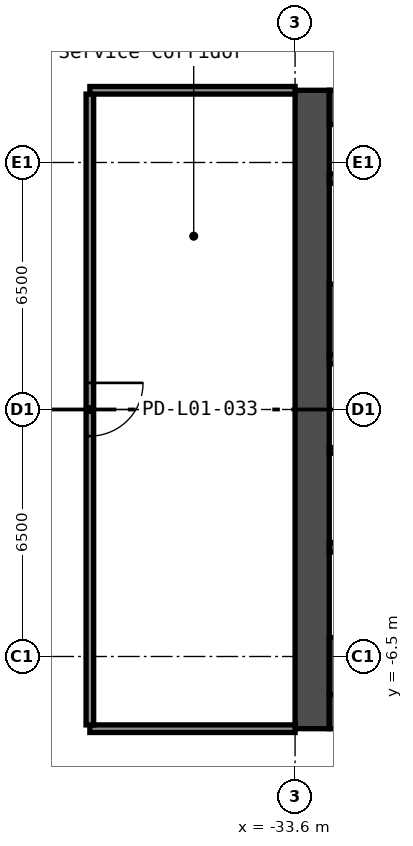
"""IFC4 building model, lengths in metres.
Left out: names, types, materials, properties, quantities, classifications, styles, units other than length and angle.
Written with IfcOpenShell. Run it as: python <this file> out.ifc"""

import sys

from ifc_helpers import new_model, si_unit, direction, frame, frame_2d, origin, place, context, subcontext, project, spatial, rectangle, extrude, element, fill, save


model = new_model("IFC4")
c1 = context("Model", 3, precision=1e-05, world=origin(), true_north=direction((0.0, 1.0)))
c2 = subcontext(c1, "Body", "Model", "MODEL_VIEW")
j1 = project(units=[si_unit("LENGTHUNIT", "METRE"), si_unit("PLANEANGLEUNIT", "RADIAN")], contexts=[c1])
p1 = place(None, origin())
s1 = spatial("IfcSite", under=j1, at=p1, CompositionType="ELEMENT")
p2 = place(p1, origin())
s2 = spatial("IfcBuilding", under=s1, at=p2, CompositionType="ELEMENT")
p3 = place(p2, origin())
s3 = spatial("IfcBuildingStorey", under=s2, at=p3, CompositionType="ELEMENT", Elevation=0.0)
p4 = place(p3, frame((-33.15, -8.4, 0.0), z_axis=(0.0, 0.0, 1.0), x_axis=(0.0, 1.0, 0.0)))
e1 = element("IfcWall", 1, at=p4, inside=s3, PredefinedType="SHEAR", context=c2, shape_type="SweptSolid", body=[
    extrude(rectangle(XDim=16.8, YDim=0.9, at=frame_2d((8.4, 0.0))), origin(), (0.0, 0.0, 1.0), 8.6),
])
p5 = place(p3, frame((-32.7, 7.95, 0.0), z_axis=(0.0, 0.0, 1.0), x_axis=(1.0, 0.0, 0.0)))
e2 = element("IfcWall", 2, at=p5, inside=s3, PredefinedType="SHEAR", context=c2, shape_type="SweptSolid", body=[
    extrude(rectangle(XDim=15.0, YDim=0.9, at=frame_2d((7.5, 0.0))), origin(), (0.0, 0.0, 1.0), 8.6),
])
p6 = place(p5, frame((3.4, 0.0, 0.0)))
e3 = element("IfcOpeningElement", 3, at=p6, cuts=e2, PredefinedType="OPENING", context=c2, shape_type="SweptSolid", body=[
    extrude(rectangle(XDim=1.2, YDim=2.1, at=frame_2d((0.6, 1.05))), frame((0.0, 0.46, 0.0), z_axis=(0.0, -1.0, 0.0), x_axis=(1.0, 0.0, 0.0)), (0.0, 0.0, 1.0), 0.92),
])
p7 = place(p5, frame((0.75, 0.0, 0.0)))
e4 = element("IfcOpeningElement", 4, at=p7, cuts=e2, PredefinedType="OPENING", context=c2, shape_type="SweptSolid", body=[
    extrude(rectangle(XDim=0.9, YDim=2.1, at=frame_2d((0.45, 1.05))), frame((0.0, 0.46, 0.0), z_axis=(0.0, -1.0, 0.0), x_axis=(1.0, 0.0, 0.0)), (0.0, 0.0, 1.0), 0.92),
])
p8 = place(p5, frame((7.05, 0.0, 0.0)))
e5 = element("IfcOpeningElement", 5, at=p8, cuts=e2, PredefinedType="OPENING", context=c2, shape_type="SweptSolid", body=[
    extrude(rectangle(XDim=1.2, YDim=2.1, at=frame_2d((0.6, 1.05))), frame((0.0, 0.46, 0.0), z_axis=(0.0, -1.0, 0.0), x_axis=(1.0, 0.0, 0.0)), (0.0, 0.0, 1.0), 0.92),
])
p9 = place(p3, frame((-32.7, -7.95, 0.0), z_axis=(0.0, 0.0, 1.0), x_axis=(1.0, 0.0, 0.0)))
e6 = element("IfcWall", 6, at=p9, inside=s3, PredefinedType="SHEAR", context=c2, shape_type="SweptSolid", body=[
    extrude(rectangle(XDim=15.0, YDim=0.9, at=frame_2d((7.5, 0.0))), origin(), (0.0, 0.0, 1.0), 8.6),
])
p10 = place(p9, frame((11.45, 0.0, 0.0)))
e7 = element("IfcOpeningElement", 7, at=p10, cuts=e6, PredefinedType="OPENING", context=c2, shape_type="SweptSolid", body=[
    extrude(rectangle(XDim=1.0, YDim=2.1, at=frame_2d((0.5, 1.05))), frame((0.0, 0.46, 0.0), z_axis=(0.0, -1.0, 0.0), x_axis=(1.0, 0.0, 0.0)), (0.0, 0.0, 1.0), 0.92),
])
p11 = place(p9, frame((9.6, 0.0, 0.0)))
e8 = element("IfcOpeningElement", 8, at=p11, cuts=e6, PredefinedType="OPENING", context=c2, shape_type="SweptSolid", body=[
    extrude(rectangle(XDim=1.2, YDim=2.1, at=frame_2d((0.6, 1.05))), frame((0.0, 0.46, 0.0), z_axis=(0.0, -1.0, 0.0), x_axis=(1.0, 0.0, 0.0)), (0.0, 0.0, 1.0), 0.92),
])
p12 = place(p3, frame((-32.7, 1.325, 0.0), z_axis=(0.0, 0.0, 1.0), x_axis=(1.0, 0.0, 0.0)))
e9 = element("IfcWall", 9, at=p12, inside=s3, PredefinedType="SHEAR", context=c2, shape_type="SweptSolid", body=[
    extrude(rectangle(XDim=5.05, YDim=0.25, at=frame_2d((2.525, 0.0))), origin(), (0.0, 0.0, 1.0), 8.6),
])
p13 = place(p12, frame((3.3, 0.0, 0.0)))
e10 = element("IfcOpeningElement", 10, at=p13, cuts=e9, PredefinedType="OPENING", context=c2, shape_type="SweptSolid", body=[
    extrude(rectangle(XDim=1.2, YDim=2.1, at=frame_2d((0.6, 1.05))), frame((0.0, 0.135, 0.0), z_axis=(0.0, -1.0, 0.0), x_axis=(1.0, 0.0, 0.0)), (0.0, 0.0, 1.0), 0.27),
])
p14 = place(p3, frame((-32.7, 2.375, 0.0), z_axis=(0.0, 0.0, 1.0), x_axis=(1.0, 0.0, 0.0)))
e11 = element("IfcWall", 11, at=p14, inside=s3, PredefinedType="SHEAR", context=c2, shape_type="SweptSolid", body=[
    extrude(rectangle(XDim=2.4, YDim=1.85, at=frame_2d((1.2, 0.0))), origin(), (0.0, 0.0, 1.0), 8.6),
])
p15 = place(p3, frame((-32.7, 6.075, 0.0), z_axis=(0.0, 0.0, 1.0), x_axis=(1.0, 0.0, 0.0)))
e12 = element("IfcWall", 12, at=p15, inside=s3, PredefinedType="SHEAR", context=c2, shape_type="SweptSolid", body=[
    extrude(rectangle(XDim=2.4, YDim=0.25, at=frame_2d((1.2, 0.0))), origin(), (0.0, 0.0, 1.0), 8.6),
])
p16 = place(p3, frame((-32.7, -3.625, 0.0), z_axis=(0.0, 0.0, 1.0), x_axis=(1.0, 0.0, 0.0)))
e13 = element("IfcWall", 13, at=p16, inside=s3, PredefinedType="SHEAR", context=c2, shape_type="SweptSolid", body=[
    extrude(rectangle(XDim=4.55, YDim=0.25, at=frame_2d((2.275, 0.0))), origin(), (0.0, 0.0, 1.0), 8.6),
])
p17 = place(p16, frame((2.85, 0.0, 0.0)))
e14 = element("IfcOpeningElement", 14, at=p17, cuts=e13, PredefinedType="OPENING", context=c2, shape_type="SweptSolid", body=[
    extrude(rectangle(XDim=1.1, YDim=2.1, at=frame_2d((0.55, 1.05))), frame((0.0, 0.135, 0.0), z_axis=(0.0, -1.0, 0.0), x_axis=(1.0, 0.0, 0.0)), (0.0, 0.0, 1.0), 0.27),
])
p18 = place(p16, frame((0.6, 0.0, 0.0)))
e15 = element("IfcOpeningElement", 15, at=p18, cuts=e13, PredefinedType="OPENING", context=c2, shape_type="SweptSolid", body=[
    extrude(rectangle(XDim=1.1, YDim=2.1, at=frame_2d((0.55, 1.05))), frame((0.0, 0.135, 0.0), z_axis=(0.0, -1.0, 0.0), x_axis=(1.0, 0.0, 0.0)), (0.0, 0.0, 1.0), 0.27),
])
p19 = place(p3, frame((-32.7, -6.75, 0.0), z_axis=(0.0, 0.0, 1.0), x_axis=(1.0, 0.0, 0.0)))
e16 = element("IfcWall", 16, at=p19, inside=s3, PredefinedType="SHEAR", context=c2, shape_type="SweptSolid", body=[
    extrude(rectangle(XDim=4.55, YDim=1.5, at=frame_2d((2.275, 0.0))), origin(), (0.0, 0.0, 1.0), 8.6),
])
p20 = place(p3, frame((-32.7, -1.075, 0.0), z_axis=(0.0, 0.0, 1.0), x_axis=(1.0, 0.0, 0.0)))
e17 = element("IfcWall", 17, at=p20, inside=s3, PredefinedType="PARTITIONING", context=c2, shape_type="SweptSolid", body=[
    extrude(rectangle(XDim=3.0, YDim=0.15, at=frame_2d((1.5, 0.0))), origin(), (0.0, 0.0, 1.0), 8.6),
])
p21 = place(p3, frame((-39.0, -8.4, 0.0), z_axis=(0.0, 0.0, 1.0), x_axis=(1.0, 0.0, 0.0)))
e18 = element("IfcWall", 18, at=p21, inside=s3, PredefinedType="PARTITIONING", context=c2, shape_type="SweptSolid", body=[
    extrude(rectangle(XDim=5.4, YDim=0.2, at=frame_2d((2.7, 0.0))), origin(), (0.0, 0.0, 1.0), 8.6),
])
p22 = place(p3, frame((-39.0, 8.3, 0.0), z_axis=(0.0, 0.0, 1.0), x_axis=(0.0, -1.0, 0.0)))
e19 = element("IfcWall", 19, at=p22, inside=s3, PredefinedType="PARTITIONING", context=c2, shape_type="SweptSolid", body=[
    extrude(rectangle(XDim=16.6, YDim=0.2, at=frame_2d((8.3, 0.0))), origin(), (0.0, 0.0, 1.0), 8.6),
])
p23 = place(p22, frame((7.6, 0.0, 0.0)))
e20 = element("IfcOpeningElement", 20, at=p23, cuts=e19, PredefinedType="OPENING", context=c2, shape_type="SweptSolid", body=[
    extrude(rectangle(XDim=1.4, YDim=2.1, at=frame_2d((0.7, 1.05))), frame((0.0, 0.11, 0.0), z_axis=(0.0, -1.0, 0.0), x_axis=(1.0, 0.0, 0.0)), (0.0, 0.0, 1.0), 0.22),
])
p24 = place(p3, frame((-33.6, 8.4, 0.0), z_axis=(0.0, 0.0, 1.0), x_axis=(-1.0, 0.0, 0.0)))
e21 = element("IfcWall", 21, at=p24, inside=s3, PredefinedType="PARTITIONING", context=c2, shape_type="SweptSolid", body=[
    extrude(rectangle(XDim=5.4, YDim=0.2, at=frame_2d((2.7, 0.0))), origin(), (0.0, 0.0, 1.0), 8.6),
])
p25 = place(p23, origin())
e22 = element("IfcDoor", 22, at=p25, inside=s3, OperationType="SINGLE_SWING_RIGHT", PredefinedType="DOOR", context=c2, shape_type="SweptSolid", body=[
    extrude(rectangle(XDim=1.4, YDim=2.1, at=frame_2d((0.7, 1.05))), frame((0.0, 0.025, 0.0), z_axis=(0.0, -1.0, 0.0), x_axis=(1.0, 0.0, 0.0)), (0.0, 0.0, 1.0), 0.05),
])
fill(e20, e22)
save(model, sys.argv[1])
